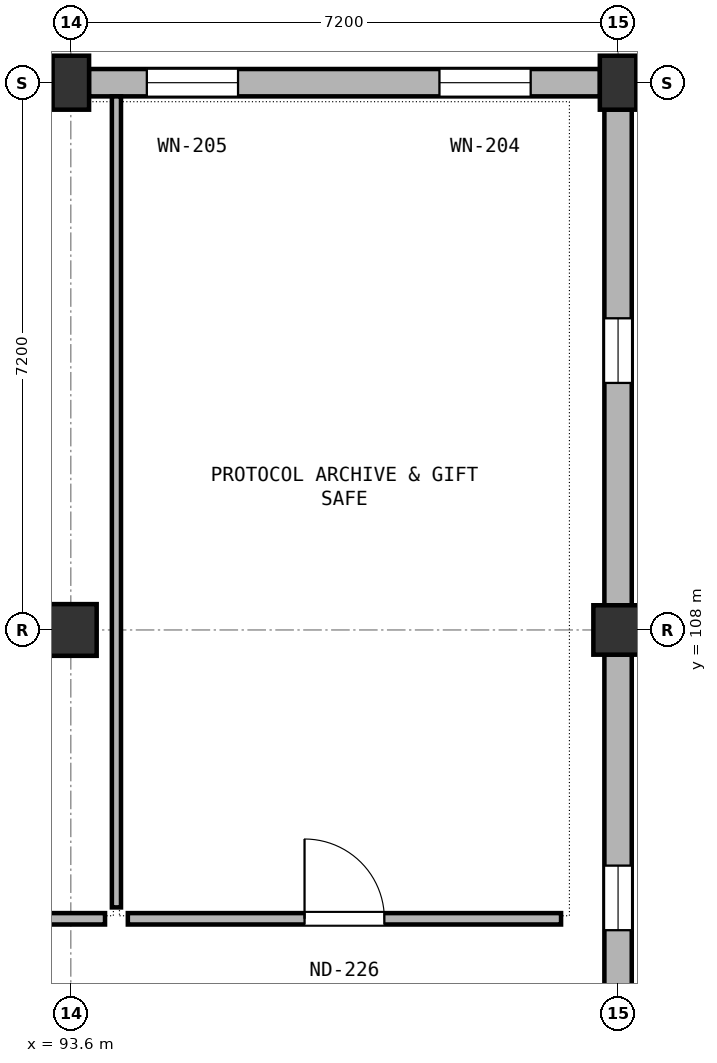
"""IFC4 building model, lengths in metres.
Left out: names, types, materials, properties, quantities, classifications, styles, units other than length and angle.
Written with IfcOpenShell. Run it as: python <this file> out.ifc"""

import sys

from ifc_helpers import new_model, si_unit, direction, frame, frame_2d, origin, origin_2d, place, context, subcontext, project, spatial, rectangle, extrude, element, fill, save


model = new_model("IFC4")
c1 = context("Model", 3, precision=1e-05, world=origin(), true_north=direction((0.0, 1.0)))
c2 = subcontext(c1, "Body", "Model", "MODEL_VIEW")
j1 = project(units=[si_unit("LENGTHUNIT", "METRE"), si_unit("PLANEANGLEUNIT", "RADIAN")], contexts=[c1])
p1 = place(None, origin())
s1 = spatial("IfcSite", under=j1, at=p1, CompositionType="ELEMENT")
p2 = place(p1, origin())
s2 = spatial("IfcBuilding", under=s1, at=p2, CompositionType="ELEMENT")
p3 = place(p2, frame((0.0, 0.0, 26.4)))
s3 = spatial("IfcBuildingStorey", under=s2, at=p3, CompositionType="ELEMENT", Elevation=26.4)
p4 = place(p3, frame((93.6, 108.0, 0.0), z_axis=(0.0, 0.0, 1.0), x_axis=(1.0, 0.0, 0.0)))
e1 = element("IfcColumn", 1, at=p4, inside=s3, PredefinedType="COLUMN", context=c2, shape_type="SweptSolid", body=[
    extrude(rectangle(XDim=0.68, YDim=0.68, at=origin_2d()), origin(), (0.0, 0.0, 1.0), 3.9),
])
p5 = place(p3, frame((93.6, 115.2, 0.0), z_axis=(0.0, 0.0, 1.0), x_axis=(1.0, 0.0, 0.0)))
e2 = element("IfcColumn", 2, at=p5, inside=s3, PredefinedType="COLUMN", context=c2, shape_type="SweptSolid", body=[
    extrude(rectangle(XDim=0.48, YDim=0.71, at=origin_2d()), origin(), (0.0, 0.0, 1.0), 3.9),
])
p6 = place(p3, frame((100.8, 108.0, 0.0), z_axis=(0.0, 0.0, 1.0), x_axis=(1.0, 0.0, 0.0)))
e3 = element("IfcColumn", 3, at=p6, inside=s3, PredefinedType="COLUMN", context=c2, shape_type="SweptSolid", body=[
    extrude(rectangle(XDim=0.65, YDim=0.65, at=origin_2d()), origin(), (0.0, 0.0, 1.0), 3.9),
])
p7 = place(p3, frame((100.8, 115.2, 0.0), z_axis=(0.0, 0.0, 1.0), x_axis=(1.0, 0.0, 0.0)))
e4 = element("IfcColumn", 4, at=p7, inside=s3, PredefinedType="COLUMN", context=c2, shape_type="SweptSolid", body=[
    extrude(rectangle(XDim=0.48, YDim=0.71, at=origin_2d()), origin(), (0.0, 0.0, 1.0), 3.9),
])
p8 = place(p3, frame((93.362, 115.2, 0.0), z_axis=(0.0, 0.0, 1.0), x_axis=(-1.0, 0.0, 0.0)))
e5 = element("IfcWall", 5, at=p8, inside=s3, PredefinedType="SOLIDWALL", context=c2, shape_type="SweptSolid", body=[
    extrude(rectangle(XDim=6.724, YDim=0.36, at=frame_2d((3.362, 0.0))), origin(), (0.0, 0.0, 1.0), 2.74),
])
p9 = place(p8, frame((0.762, 0.0, 0.7)))
e6 = element("IfcOpeningElement", 6, at=p9, cuts=e5, PredefinedType="OPENING", context=c2, shape_type="SweptSolid", body=[
    extrude(rectangle(XDim=1.2, YDim=1.84, at=frame_2d((0.6, 0.92))), frame((0.0, 0.19, 0.0), z_axis=(0.0, -1.0, 0.0), x_axis=(1.0, 0.0, 0.0)), (0.0, 0.0, 1.0), 0.38),
])
p10 = place(p8, frame((4.612, 0.0, 0.7)))
e7 = element("IfcOpeningElement", 7, at=p10, cuts=e5, PredefinedType="OPENING", context=c2, shape_type="SweptSolid", body=[
    extrude(rectangle(XDim=1.2, YDim=1.84, at=frame_2d((0.6, 0.92))), frame((0.0, 0.19, 0.0), z_axis=(0.0, -1.0, 0.0), x_axis=(1.0, 0.0, 0.0)), (0.0, 0.0, 1.0), 0.38),
])
p11 = place(p3, frame((100.562, 115.2, 0.0), z_axis=(0.0, 0.0, 1.0), x_axis=(-1.0, 0.0, 0.0)))
e8 = element("IfcWall", 8, at=p11, inside=s3, PredefinedType="SOLIDWALL", context=c2, shape_type="SweptSolid", body=[
    extrude(rectangle(XDim=6.724, YDim=0.36, at=frame_2d((3.362, 0.0))), origin(), (0.0, 0.0, 1.0), 2.74),
])
p12 = place(p11, frame((0.912, 0.0, 0.7)))
e9 = element("IfcOpeningElement", 9, at=p12, cuts=e8, PredefinedType="OPENING", context=c2, shape_type="SweptSolid", body=[
    extrude(rectangle(XDim=1.2, YDim=1.84, at=frame_2d((0.6, 0.92))), frame((0.0, 0.19, 0.0), z_axis=(0.0, -1.0, 0.0), x_axis=(1.0, 0.0, 0.0)), (0.0, 0.0, 1.0), 0.38),
])
p13 = place(p11, frame((4.762, 0.0, 0.7)))
e10 = element("IfcOpeningElement", 10, at=p13, cuts=e8, PredefinedType="OPENING", context=c2, shape_type="SweptSolid", body=[
    extrude(rectangle(XDim=1.2, YDim=1.84, at=frame_2d((0.6, 0.92))), frame((0.0, 0.19, 0.0), z_axis=(0.0, -1.0, 0.0), x_axis=(1.0, 0.0, 0.0)), (0.0, 0.0, 1.0), 0.38),
])
p14 = place(p3, frame((100.8, 107.677, 0.0), z_axis=(0.0, 0.0, 1.0), x_axis=(0.0, -1.0, 0.0)))
e11 = element("IfcWall", 11, at=p14, inside=s3, PredefinedType="SOLIDWALL", context=c2, shape_type="SweptSolid", body=[
    extrude(rectangle(XDim=6.554, YDim=0.36, at=frame_2d((3.277, 0.0))), origin(), (0.0, 0.0, 1.0), 2.74),
])
p15 = place(p14, frame((2.777, 0.0, 0.7)))
e12 = element("IfcOpeningElement", 12, at=p15, cuts=e11, PredefinedType="OPENING", context=c2, shape_type="SweptSolid", body=[
    extrude(rectangle(XDim=0.85, YDim=1.89, at=frame_2d((0.425, 0.945))), frame((0.0, 0.19, 0.0), z_axis=(0.0, -1.0, 0.0), x_axis=(1.0, 0.0, 0.0)), (0.0, 0.0, 1.0), 0.38),
])
p16 = place(p3, frame((100.8, 114.847, 0.0), z_axis=(0.0, 0.0, 1.0), x_axis=(0.0, -1.0, 0.0)))
e13 = element("IfcWall", 13, at=p16, inside=s3, PredefinedType="SOLIDWALL", context=c2, shape_type="SweptSolid", body=[
    extrude(rectangle(XDim=6.524, YDim=0.36, at=frame_2d((3.262, 0.0))), origin(), (0.0, 0.0, 1.0), 2.74),
])
p17 = place(p16, frame((2.747, 0.0, 0.7)))
e14 = element("IfcOpeningElement", 14, at=p17, cuts=e13, PredefinedType="OPENING", context=c2, shape_type="SweptSolid", body=[
    extrude(rectangle(XDim=0.85, YDim=1.89, at=frame_2d((0.425, 0.945))), frame((0.0, 0.19, 0.0), z_axis=(0.0, -1.0, 0.0), x_axis=(1.0, 0.0, 0.0)), (0.0, 0.0, 1.0), 0.38),
])
p18 = place(p3, frame((85.55, 104.2, 0.0), z_axis=(0.0, 0.0, 1.0), x_axis=(1.0, 0.0, 0.0)))
e15 = element("IfcWall", 15, at=p18, inside=s3, PredefinedType="PARTITIONING", context=c2, shape_type="SweptSolid", body=[
    extrude(rectangle(XDim=8.5, YDim=0.15, at=frame_2d((4.25, 0.0))), origin(), (0.0, 0.0, 1.0), 2.78),
])
p19 = place(p18, frame((3.75, 0.0, 0.0)))
e16 = element("IfcOpeningElement", 16, at=p19, cuts=e15, PredefinedType="OPENING", context=c2, shape_type="SweptSolid", body=[
    extrude(rectangle(XDim=1.0, YDim=2.15, at=frame_2d((0.5, 1.075))), frame((0.0, 0.085, 0.0), z_axis=(0.0, -1.0, 0.0), x_axis=(1.0, 0.0, 0.0)), (0.0, 0.0, 1.0), 0.17),
])
p20 = place(p3, frame((94.35, 104.2, 0.0), z_axis=(0.0, 0.0, 1.0), x_axis=(1.0, 0.0, 0.0)))
e17 = element("IfcWall", 17, at=p20, inside=s3, PredefinedType="PARTITIONING", context=c2, shape_type="SweptSolid", body=[
    extrude(rectangle(XDim=5.7, YDim=0.15, at=frame_2d((2.85, 0.0))), origin(), (0.0, 0.0, 1.0), 2.78),
])
p21 = place(p20, frame((2.325, 0.0, 0.0)))
e18 = element("IfcOpeningElement", 18, at=p21, cuts=e17, PredefinedType="OPENING", context=c2, shape_type="SweptSolid", body=[
    extrude(rectangle(XDim=1.05, YDim=2.15, at=frame_2d((0.525, 1.075))), frame((0.0, 0.085, 0.0), z_axis=(0.0, -1.0, 0.0), x_axis=(1.0, 0.0, 0.0)), (0.0, 0.0, 1.0), 0.17),
])
p22 = place(p3, frame((94.2, 104.35, 0.0), z_axis=(0.0, 0.0, 1.0), x_axis=(0.0, 1.0, 0.0)))
e19 = element("IfcWall", 19, at=p22, inside=s3, PredefinedType="PARTITIONING", context=c2, shape_type="SweptSolid", body=[
    extrude(rectangle(XDim=10.67, YDim=0.12, at=frame_2d((5.335, 0.0))), origin(), (0.0, 0.0, 1.0), 2.78),
])
p23 = place(p12, origin())
e20 = element("IfcWindow", 20, at=p23, inside=s3, PartitioningType="DOUBLE_PANEL_VERTICAL", PredefinedType="WINDOW", context=c2, shape_type="SweptSolid", body=[
    extrude(rectangle(XDim=1.2, YDim=1.84, at=frame_2d((0.6, 0.92))), frame((0.0, 0.03, 0.0), z_axis=(0.0, -1.0, 0.0), x_axis=(1.0, 0.0, 0.0)), (0.0, 0.0, 1.0), 0.06),
])
fill(e9, e20)
p24 = place(p13, origin())
e21 = element("IfcWindow", 21, at=p24, inside=s3, PartitioningType="DOUBLE_PANEL_VERTICAL", PredefinedType="WINDOW", context=c2, shape_type="SweptSolid", body=[
    extrude(rectangle(XDim=1.2, YDim=1.84, at=frame_2d((0.6, 0.92))), frame((0.0, 0.03, 0.0), z_axis=(0.0, -1.0, 0.0), x_axis=(1.0, 0.0, 0.0)), (0.0, 0.0, 1.0), 0.06),
])
fill(e10, e21)
p25 = place(p15, origin())
e22 = element("IfcWindow", 22, at=p25, inside=s3, PartitioningType="SINGLE_PANEL", PredefinedType="WINDOW", context=c2, shape_type="SweptSolid", body=[
    extrude(rectangle(XDim=0.85, YDim=1.89, at=frame_2d((0.425, 0.945))), frame((0.0, 0.03, 0.0), z_axis=(0.0, -1.0, 0.0), x_axis=(1.0, 0.0, 0.0)), (0.0, 0.0, 1.0), 0.06),
])
fill(e12, e22)
p26 = place(p17, origin())
e23 = element("IfcWindow", 23, at=p26, inside=s3, PartitioningType="SINGLE_PANEL", PredefinedType="WINDOW", context=c2, shape_type="SweptSolid", body=[
    extrude(rectangle(XDim=0.85, YDim=1.89, at=frame_2d((0.425, 0.945))), frame((0.0, 0.03, 0.0), z_axis=(0.0, -1.0, 0.0), x_axis=(1.0, 0.0, 0.0)), (0.0, 0.0, 1.0), 0.06),
])
fill(e14, e23)
p27 = place(p21, origin())
e24 = element("IfcDoor", 24, at=p27, inside=s3, OperationType="SINGLE_SWING_LEFT", PredefinedType="DOOR", context=c2, shape_type="SweptSolid", body=[
    extrude(rectangle(XDim=1.05, YDim=2.15, at=frame_2d((0.525, 1.075))), frame((0.0, 0.025, 0.0), z_axis=(0.0, -1.0, 0.0), x_axis=(1.0, 0.0, 0.0)), (0.0, 0.0, 1.0), 0.05),
])
fill(e18, e24)
save(model, sys.argv[1])
